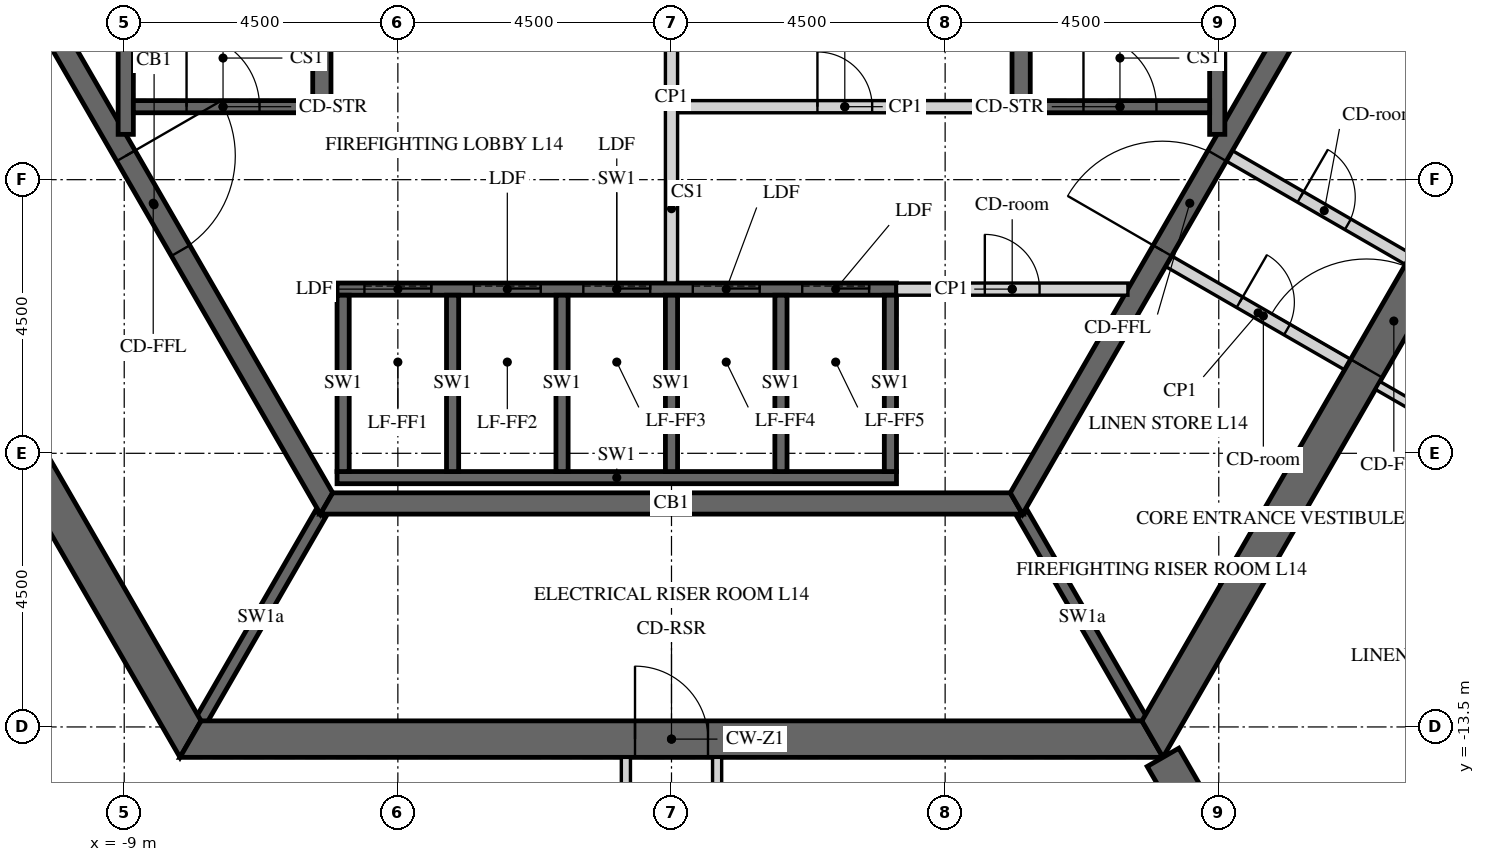
"""IFC4 building model, lengths in metres.
Left out: names, types, materials, properties, quantities, classifications, styles, units other than length and angle.
Written with IfcOpenShell. Run it as: python <this file> out.ifc"""

import sys

from ifc_helpers import new_model, si_unit, direction, frame, frame_2d, origin, place, context, subcontext, project, spatial, polyline, rectangle, outline, extrude, element, fill, save


model = new_model("IFC4")
c1 = context("Model", 3, precision=1e-05, world=origin(), true_north=direction((0.0, 1.0)))
c2 = subcontext(c1, "Body", "Model", "MODEL_VIEW")
j1 = project(units=[si_unit("LENGTHUNIT", "METRE"), si_unit("PLANEANGLEUNIT", "RADIAN")], contexts=[c1])
p1 = place(None, origin())
s1 = spatial("IfcSite", under=j1, at=p1, CompositionType="ELEMENT")
p2 = place(p1, origin())
s2 = spatial("IfcBuilding", under=s1, at=p2, CompositionType="ELEMENT")
p3 = place(p2, frame((0.0, 0.0, 68.7)))
s3 = spatial("IfcBuildingStorey", under=s2, at=p3, CompositionType="ELEMENT", Elevation=68.7)
p4 = place(p3, frame((-15.819, 0.0, -0.15), z_axis=(0.0, 0.0, 1.0), x_axis=(0.499999880136, -0.866025472988, 0.0)))
e1 = element("IfcWall", 1, at=p4, inside=s3, PredefinedType="SHEAR", context=c2, shape_type="SweptSolid", body=[
    extrude(outline(polyline([(-0.173, -0.3), (15.993, -0.3), (15.646, 0.3), (0.173, 0.3), (-0.173, -0.3)])), origin(), (0.0, 0.0, 1.0), 3.9),
])
p5 = place(p4, frame((6.981, 0.0, 0.15)))
e2 = element("IfcOpeningElement", 2, at=p5, cuts=e1, PredefinedType="OPENING", context=c2, shape_type="SweptSolid", body=[
    extrude(rectangle(XDim=1.8, YDim=2.4, at=frame_2d((0.9, 1.2))), frame((0.0, 0.31, 0.0), z_axis=(0.0, -1.0, 0.0), x_axis=(1.0, 0.0, 0.0)), (0.0, 0.0, 1.0), 0.62),
])
p6 = place(p3, frame((-7.91, -13.7, -0.15), z_axis=(0.0, 0.0, 1.0), x_axis=(1.0, 0.0, 0.0)))
e3 = element("IfcWall", 3, at=p6, inside=s3, PredefinedType="SHEAR", context=c2, shape_type="SweptSolid", body=[
    extrude(outline(polyline([(-0.173, -0.3), (15.993, -0.3), (15.646, 0.3), (0.173, 0.3), (-0.173, -0.3)])), origin(), (0.0, 0.0, 1.0), 3.9),
])
p7 = place(p6, frame((7.31, 0.0, 0.15)))
e4 = element("IfcOpeningElement", 4, at=p7, cuts=e3, PredefinedType="OPENING", context=c2, shape_type="SweptSolid", body=[
    extrude(rectangle(XDim=1.2, YDim=2.4, at=frame_2d((0.6, 1.2))), frame((0.0, 0.31, 0.0), z_axis=(0.0, -1.0, 0.0), x_axis=(1.0, 0.0, 0.0)), (0.0, 0.0, 1.0), 0.62),
])
p8 = place(p3, frame((7.91, -13.7, -0.15), z_axis=(0.0, 0.0, 1.0), x_axis=(0.499999880136, 0.866025472988, 0.0)))
e5 = element("IfcWall", 5, at=p8, inside=s3, PredefinedType="SHEAR", context=c2, shape_type="SweptSolid", body=[
    extrude(outline(polyline([(-0.173, -0.3), (15.993, -0.3), (15.646, 0.3), (0.173, 0.3), (-0.173, -0.3)])), origin(), (0.0, 0.0, 1.0), 3.9),
])
p9 = place(p8, frame((7.039, 0.0, 0.15)))
e6 = element("IfcOpeningElement", 6, at=p9, cuts=e5, PredefinedType="OPENING", context=c2, shape_type="SweptSolid", body=[
    extrude(rectangle(XDim=1.8, YDim=2.4, at=frame_2d((0.9, 1.2))), frame((0.0, 0.31, 0.0), z_axis=(0.0, -1.0, 0.0), x_axis=(1.0, 0.0, 0.0)), (0.0, 0.0, 1.0), 0.62),
])
p10 = place(p3, frame((8.083, -14.0, -0.15), z_axis=(0.0, 0.0, 1.0), x_axis=(0.499997680643, -0.866026742862, 0.0)))
e7 = element("IfcWall", 7, at=p10, inside=s3, PredefinedType="SHEAR", context=c2, shape_type="SweptSolid", body=[
    extrude(rectangle(XDim=16.509, YDim=0.6, at=frame_2d((8.254, 0.0))), origin(), (0.0, 0.0, 1.0), 3.9),
])
p11 = place(p10, frame((7.354, 0.0, 0.15)))
e8 = element("IfcOpeningElement", 8, at=p11, cuts=e7, PredefinedType="OPENING", context=c2, shape_type="SweptSolid", body=[
    extrude(rectangle(XDim=1.8, YDim=2.4, at=frame_2d((0.9, 1.2))), frame((0.0, 0.31, 0.0), z_axis=(0.0, -1.0, 0.0), x_axis=(1.0, 0.0, 0.0)), (0.0, 0.0, 1.0), 0.62),
])
p12 = place(p3, frame((-11.345, 0.0, -0.15), z_axis=(0.0, 0.0, 1.0), x_axis=(0.499995046907, -0.866028263435, 0.0)))
e9 = element("IfcWall", 9, at=p12, inside=s3, PredefinedType="SHEAR", context=c2, shape_type="SweptSolid", body=[
    extrude(outline(polyline([(-0.101, -0.175), (11.446, -0.175), (11.244, 0.175), (0.101, 0.175), (-0.101, -0.175)])), origin(), (0.0, 0.0, 1.0), 3.9),
])
p13 = place(p12, frame((4.744, 0.0, 0.15)))
e10 = element("IfcOpeningElement", 10, at=p13, cuts=e9, PredefinedType="OPENING", context=c2, shape_type="SweptSolid", body=[
    extrude(rectangle(XDim=1.8, YDim=2.4, at=frame_2d((0.9, 1.2))), frame((0.0, 0.185, 0.0), z_axis=(0.0, -1.0, 0.0), x_axis=(1.0, 0.0, 0.0)), (0.0, 0.0, 1.0), 0.37),
])
p14 = place(p3, frame((-5.673, -9.825, -0.15), z_axis=(0.0, 0.0, 1.0), x_axis=(1.0, 0.0, 0.0)))
e11 = element("IfcWall", 11, at=p14, inside=s3, PredefinedType="SHEAR", context=c2, shape_type="SweptSolid", body=[
    extrude(outline(polyline([(-0.101, -0.175), (11.446, -0.175), (11.244, 0.175), (0.101, 0.175), (-0.101, -0.175)])), origin(), (0.0, 0.0, 1.0), 3.9),
])
p15 = place(p3, frame((5.673, -9.825, -0.15), z_axis=(0.0, 0.0, 1.0), x_axis=(0.499995046907, 0.866028263435, 0.0)))
e12 = element("IfcWall", 12, at=p15, inside=s3, PredefinedType="SHEAR", context=c2, shape_type="SweptSolid", body=[
    extrude(outline(polyline([(-0.101, -0.175), (11.446, -0.175), (11.244, 0.175), (0.101, 0.175), (-0.101, -0.175)])), origin(), (0.0, 0.0, 1.0), 3.9),
])
p16 = place(p15, frame((4.801, 0.0, 0.15)))
e13 = element("IfcOpeningElement", 13, at=p16, cuts=e12, PredefinedType="OPENING", context=c2, shape_type="SweptSolid", body=[
    extrude(rectangle(XDim=1.8, YDim=2.4, at=frame_2d((0.9, 1.2))), frame((0.0, 0.185, 0.0), z_axis=(0.0, -1.0, 0.0), x_axis=(1.0, 0.0, 0.0)), (0.0, 0.0, 1.0), 0.37),
])
p17 = place(p3, frame((-5.5, -6.3, -0.25), z_axis=(0.0, 0.0, 1.0), x_axis=(1.0, 0.0, 0.0)))
e14 = element("IfcWall", 14, at=p17, inside=s3, PredefinedType="SHEAR", context=c2, shape_type="SweptSolid", body=[
    extrude(rectangle(XDim=9.2, YDim=0.2, at=frame_2d((4.6, 0.0))), origin(), (0.0, 0.0, 1.0), 3.9),
])
p18 = place(p17, frame((0.45, 0.0, 0.25)))
e15 = element("IfcOpeningElement", 15, at=p18, cuts=e14, PredefinedType="OPENING", context=c2, shape_type="SweptSolid", body=[
    extrude(rectangle(XDim=1.1, YDim=2.1, at=frame_2d((0.55, 1.05))), frame((0.0, 0.11, 0.0), z_axis=(0.0, -1.0, 0.0), x_axis=(1.0, 0.0, 0.0)), (0.0, 0.0, 1.0), 0.22),
])
p19 = place(p17, frame((2.25, 0.0, 0.25)))
e16 = element("IfcOpeningElement", 16, at=p19, cuts=e14, PredefinedType="OPENING", context=c2, shape_type="SweptSolid", body=[
    extrude(rectangle(XDim=1.1, YDim=2.1, at=frame_2d((0.55, 1.05))), frame((0.0, 0.11, 0.0), z_axis=(0.0, -1.0, 0.0), x_axis=(1.0, 0.0, 0.0)), (0.0, 0.0, 1.0), 0.22),
])
p20 = place(p17, frame((4.05, 0.0, 0.25)))
e17 = element("IfcOpeningElement", 17, at=p20, cuts=e14, PredefinedType="OPENING", context=c2, shape_type="SweptSolid", body=[
    extrude(rectangle(XDim=1.1, YDim=2.1, at=frame_2d((0.55, 1.05))), frame((0.0, 0.11, 0.0), z_axis=(0.0, -1.0, 0.0), x_axis=(1.0, 0.0, 0.0)), (0.0, 0.0, 1.0), 0.22),
])
p21 = place(p17, frame((5.85, 0.0, 0.25)))
e18 = element("IfcOpeningElement", 18, at=p21, cuts=e14, PredefinedType="OPENING", context=c2, shape_type="SweptSolid", body=[
    extrude(rectangle(XDim=1.1, YDim=2.1, at=frame_2d((0.55, 1.05))), frame((0.0, 0.11, 0.0), z_axis=(0.0, -1.0, 0.0), x_axis=(1.0, 0.0, 0.0)), (0.0, 0.0, 1.0), 0.22),
])
p22 = place(p17, frame((7.65, 0.0, 0.25)))
e19 = element("IfcOpeningElement", 19, at=p22, cuts=e14, PredefinedType="OPENING", context=c2, shape_type="SweptSolid", body=[
    extrude(rectangle(XDim=1.1, YDim=2.1, at=frame_2d((0.55, 1.05))), frame((0.0, 0.11, 0.0), z_axis=(0.0, -1.0, 0.0), x_axis=(1.0, 0.0, 0.0)), (0.0, 0.0, 1.0), 0.22),
])
p23 = place(p3, frame((-5.5, -9.4, -0.25), z_axis=(0.0, 0.0, 1.0), x_axis=(1.0, 0.0, 0.0)))
e20 = element("IfcWall", 20, at=p23, inside=s3, PredefinedType="SHEAR", context=c2, shape_type="SweptSolid", body=[
    extrude(rectangle(XDim=9.2, YDim=0.2, at=frame_2d((4.6, 0.0))), origin(), (0.0, 0.0, 1.0), 3.9),
])
for number, where, z_axis, x_axis in (
    (21, (-5.4, -9.3, -0.25), (0.0, 0.0, 1.0), (0.0, 1.0, 0.0)),
    (22, (-3.6, -9.3, -0.25), (0.0, 0.0, 1.0), (0.0, 1.0, 0.0)),
    (23, (-1.8, -9.3, -0.25), (0.0, 0.0, 1.0), (0.0, 1.0, 0.0)),
    (24, (0.0, -9.3, -0.25), (0.0, 0.0, 1.0), (0.0, 1.0, 0.0)),
    (25, (1.8, -9.3, -0.25), (0.0, 0.0, 1.0), (0.0, 1.0, 0.0)),
    (26, (3.6, -9.3, -0.25), (0.0, 0.0, 1.0), (0.0, 1.0, 0.0)),
):
    element("IfcWall", number, at=place(p3, frame(where, z_axis=z_axis, x_axis=x_axis)), inside=s3, PredefinedType="SHEAR", context=c2, shape_type="SweptSolid", body=[
        extrude(rectangle(XDim=2.9, YDim=0.2, at=frame_2d((1.45, 0.0))), origin(), (0.0, 0.0, 1.0), 3.9),
    ])
p24 = place(p3, frame((0.1, -3.3, 0.0), z_axis=(0.0, 0.0, 1.0), x_axis=(1.0, 0.0, 0.0)))
e27 = element("IfcWall", 27, at=p24, inside=s3, PredefinedType="PARTITIONING", context=c2, shape_type="SweptSolid", body=[
    extrude(rectangle(XDim=5.5, YDim=0.2, at=frame_2d((2.75, 0.0))), origin(), (0.0, 0.0, 1.0), 3.65),
])
p25 = place(p24, frame((2.3, 0.0, 0.0)))
e28 = element("IfcOpeningElement", 28, at=p25, cuts=e27, PredefinedType="OPENING", context=c2, shape_type="SweptSolid", body=[
    extrude(rectangle(XDim=0.9, YDim=2.1, at=frame_2d((0.45, 1.05))), frame((0.0, 0.11, 0.0), z_axis=(0.0, -1.0, 0.0), x_axis=(1.0, 0.0, 0.0)), (0.0, 0.0, 1.0), 0.22),
])
p26 = place(p3, frame((0.0, -6.2, 0.0), z_axis=(0.0, 0.0, 1.0), x_axis=(0.0, 1.0, 0.0)))
e29 = element("IfcWall", 29, at=p26, inside=s3, PredefinedType="PARTITIONING", context=c2, shape_type="SweptSolid", body=[
    extrude(rectangle(XDim=6.1, YDim=0.2, at=frame_2d((3.05, 0.0))), origin(), (0.0, 0.0, 1.0), 3.65),
])
p27 = place(p3, frame((3.7, -6.3, 0.0), z_axis=(0.0, 0.0, 1.0), x_axis=(1.0, 0.0, 0.0)))
e30 = element("IfcWall", 30, at=p27, inside=s3, PredefinedType="PARTITIONING", context=c2, shape_type="SweptSolid", body=[
    extrude(rectangle(XDim=3.806, YDim=0.2, at=frame_2d((1.903, 0.0))), origin(), (0.0, 0.0, 1.0), 3.65),
])
p28 = place(p27, frame((1.453, 0.0, 0.0)))
e31 = element("IfcOpeningElement", 31, at=p28, cuts=e30, PredefinedType="OPENING", context=c2, shape_type="SweptSolid", body=[
    extrude(rectangle(XDim=0.9, YDim=2.1, at=frame_2d((0.45, 1.05))), frame((0.0, 0.11, 0.0), z_axis=(0.0, -1.0, 0.0), x_axis=(1.0, 0.0, 0.0)), (0.0, 0.0, 1.0), 0.22),
])
for number, where, z_axis, x_axis in (
    (32, (-5.773, -10.0, -0.15), (0.0, 0.0, 1.0), (-0.5, -0.866, 0.0)),
    (33, (5.773, -10.0, -0.15), (0.0, 0.0, 1.0), (0.5, -0.866, 0.0)),
):
    element("IfcWall", number, at=place(p3, frame(where, z_axis=z_axis, x_axis=x_axis)), inside=s3, PredefinedType="SHEAR", context=c2, shape_type="SweptSolid", body=[
        extrude(rectangle(XDim=3.926, YDim=0.2, at=frame_2d((1.963, 0.0))), origin(), (0.0, 0.0, 1.0), 3.9),
    ])
p29 = place(p3, frame((9.175, -4.109, 0.0), z_axis=(0.0, 0.0, 1.0), x_axis=(0.865989465428, -0.500062241894, 0.0)))
e34 = element("IfcWall", 34, at=p29, inside=s3, PredefinedType="PARTITIONING", context=c2, shape_type="SweptSolid", body=[
    extrude(rectangle(XDim=3.4, YDim=0.2, at=frame_2d((1.7, 0.0))), origin(), (0.0, 0.0, 1.0), 3.65),
])
p30 = place(p29, frame((1.351, 0.0, 0.0)))
e35 = element("IfcOpeningElement", 35, at=p30, cuts=e34, PredefinedType="OPENING", context=c2, shape_type="SweptSolid", body=[
    extrude(rectangle(XDim=0.9, YDim=2.1, at=frame_2d((0.45, 1.05))), frame((0.0, 0.11, 0.0), z_axis=(0.0, -1.0, 0.0), x_axis=(1.0, 0.0, 0.0)), (0.0, 0.0, 1.0), 0.22),
])
p31 = place(p3, frame((8.175, -5.841, 0.0), z_axis=(0.0, 0.0, 1.0), x_axis=(0.866020560687, -0.500008388397, 0.0)))
e36 = element("IfcWall", 36, at=p31, inside=s3, PredefinedType="PARTITIONING", context=c2, shape_type="SweptSolid", body=[
    extrude(rectangle(XDim=3.4, YDim=0.2, at=frame_2d((1.7, 0.0))), origin(), (0.0, 0.0, 1.0), 3.65),
])
p32 = place(p31, frame((1.35, 0.0, 0.0)))
e37 = element("IfcOpeningElement", 37, at=p32, cuts=e36, PredefinedType="OPENING", context=c2, shape_type="SweptSolid", body=[
    extrude(rectangle(XDim=0.9, YDim=2.1, at=frame_2d((0.45, 1.05))), frame((0.0, 0.11, 0.0), z_axis=(0.0, -1.0, 0.0), x_axis=(1.0, 0.0, 0.0)), (0.0, 0.0, 1.0), 0.22),
])
p33 = place(p3, frame((5.75, -3.4, -0.25), z_axis=(0.0, 0.0, 1.0), x_axis=(0.0, 1.0, 0.0)))
e38 = element("IfcWall", 38, at=p33, inside=s3, PredefinedType="SHEAR", context=c2, shape_type="SweptSolid", body=[
    extrude(rectangle(XDim=6.8, YDim=0.3, at=frame_2d((3.4, 0.0))), origin(), (0.0, 0.0, 1.0), 3.9),
])
p34 = place(p3, frame((8.975, -3.755, -0.25), z_axis=(0.0, 0.0, 1.0), x_axis=(0.0, 1.0, 0.0)))
e39 = element("IfcWall", 39, at=p34, inside=s3, PredefinedType="SHEAR", context=c2, shape_type="SweptSolid", body=[
    extrude(rectangle(XDim=7.51, YDim=0.25, at=frame_2d((3.755, 0.0))), origin(), (0.0, 0.0, 1.0), 3.9),
])
p35 = place(p3, frame((5.9, -3.3, -0.25), z_axis=(0.0, 0.0, 1.0), x_axis=(1.0, 0.0, 0.0)))
e40 = element("IfcWall", 40, at=p35, inside=s3, PredefinedType="SHEAR", context=c2, shape_type="SweptSolid", body=[
    extrude(rectangle(XDim=2.95, YDim=0.2, at=frame_2d((1.475, 0.0))), origin(), (0.0, 0.0, 1.0), 3.9),
])
p36 = place(p35, frame((0.875, 0.0, 0.25)))
e41 = element("IfcOpeningElement", 41, at=p36, cuts=e40, PredefinedType="OPENING", context=c2, shape_type="SweptSolid", body=[
    extrude(rectangle(XDim=1.2, YDim=2.4, at=frame_2d((0.6, 1.2))), frame((0.0, 0.11, 0.0), z_axis=(0.0, -1.0, 0.0), x_axis=(1.0, 0.0, 0.0)), (0.0, 0.0, 1.0), 0.22),
])
p37 = place(p3, frame((-5.75, -3.4, -0.25), z_axis=(0.0, 0.0, 1.0), x_axis=(0.0, 1.0, 0.0)))
e42 = element("IfcWall", 42, at=p37, inside=s3, PredefinedType="SHEAR", context=c2, shape_type="SweptSolid", body=[
    extrude(rectangle(XDim=6.8, YDim=0.3, at=frame_2d((3.4, 0.0))), origin(), (0.0, 0.0, 1.0), 3.9),
])
p38 = place(p3, frame((-8.975, -3.755, -0.25), z_axis=(0.0, 0.0, 1.0), x_axis=(0.0, 1.0, 0.0)))
e43 = element("IfcWall", 43, at=p38, inside=s3, PredefinedType="SHEAR", context=c2, shape_type="SweptSolid", body=[
    extrude(rectangle(XDim=7.51, YDim=0.25, at=frame_2d((3.755, 0.0))), origin(), (0.0, 0.0, 1.0), 3.9),
])
p39 = place(p3, frame((-8.85, -3.3, -0.25), z_axis=(0.0, 0.0, 1.0), x_axis=(1.0, 0.0, 0.0)))
e44 = element("IfcWall", 44, at=p39, inside=s3, PredefinedType="SHEAR", context=c2, shape_type="SweptSolid", body=[
    extrude(rectangle(XDim=2.95, YDim=0.2, at=frame_2d((1.475, 0.0))), origin(), (0.0, 0.0, 1.0), 3.9),
])
p40 = place(p39, frame((0.875, 0.0, 0.25)))
e45 = element("IfcOpeningElement", 45, at=p40, cuts=e44, PredefinedType="OPENING", context=c2, shape_type="SweptSolid", body=[
    extrude(rectangle(XDim=1.2, YDim=2.4, at=frame_2d((0.6, 1.2))), frame((0.0, 0.11, 0.0), z_axis=(0.0, -1.0, 0.0), x_axis=(1.0, 0.0, 0.0)), (0.0, 0.0, 1.0), 0.22),
])
p41 = place(p3, frame((-0.75, -14.0, 0.0), z_axis=(0.0, 0.0, 1.0), x_axis=(0.0, -1.0, 0.0)))
e46 = element("IfcWall", 46, at=p41, inside=s3, PredefinedType="PARTITIONING", context=c2, shape_type="SweptSolid", body=[
    extrude(rectangle(XDim=6.252, YDim=0.15, at=frame_2d((3.126, 0.0))), origin(), (0.0, 0.0, 1.0), 2.988),
])
p42 = place(p3, frame((0.75, -20.072, 0.0), z_axis=(0.0, 0.0, 1.0), x_axis=(0.0, 1.0, 0.0)))
e47 = element("IfcWall", 47, at=p42, inside=s3, PredefinedType="PARTITIONING", context=c2, shape_type="SweptSolid", body=[
    extrude(rectangle(XDim=6.072, YDim=0.15, at=frame_2d((3.036, 0.0))), origin(), (0.0, 0.0, 1.0), 2.988),
])
p43 = place(p3, frame((11.614, -7.884, 0.0), z_axis=(0.0, 0.0, 1.0), x_axis=(0.866033542371, -0.499985903289, 0.0)))
e48 = element("IfcWall", 48, at=p43, inside=s3, PredefinedType="PARTITIONING", context=c2, shape_type="SweptSolid", body=[
    extrude(rectangle(XDim=6.15, YDim=0.15, at=frame_2d((3.075, 0.0))), origin(), (0.0, 0.0, 1.0), 2.988),
])
p44 = place(p9, origin())
e49 = element("IfcDoor", 49, at=p44, inside=s3, OperationType="DOUBLE_DOOR_SINGLE_SWING", PredefinedType="DOOR", context=c2, shape_type="SweptSolid", body=[
    extrude(rectangle(XDim=1.8, YDim=2.4, at=frame_2d((0.9, 1.2))), frame((0.0, 0.025, 0.0), z_axis=(0.0, -1.0, 0.0), x_axis=(1.0, 0.0, 0.0)), (0.0, 0.0, 1.0), 0.05),
])
fill(e6, e49)
p45 = place(p7, origin())
e50 = element("IfcDoor", 50, at=p45, inside=s3, OperationType="SINGLE_SWING_LEFT", PredefinedType="DOOR", context=c2, shape_type="SweptSolid", body=[
    extrude(rectangle(XDim=1.2, YDim=2.4, at=frame_2d((0.6, 1.2))), frame((0.0, 0.025, 0.0), z_axis=(0.0, -1.0, 0.0), x_axis=(1.0, 0.0, 0.0)), (0.0, 0.0, 1.0), 0.05),
])
fill(e4, e50)
p46 = place(p13, origin())
e51 = element("IfcDoor", 51, at=p46, inside=s3, OperationType="DOUBLE_DOOR_SINGLE_SWING", PredefinedType="DOOR", context=c2, shape_type="SweptSolid", body=[
    extrude(rectangle(XDim=1.8, YDim=2.4, at=frame_2d((0.9, 1.2))), frame((0.0, 0.025, 0.0), z_axis=(0.0, -1.0, 0.0), x_axis=(1.0, 0.0, 0.0)), (0.0, 0.0, 1.0), 0.05),
])
fill(e10, e51)
p47 = place(p16, origin())
e52 = element("IfcDoor", 52, at=p47, inside=s3, OperationType="DOUBLE_DOOR_SINGLE_SWING", PredefinedType="DOOR", context=c2, shape_type="SweptSolid", body=[
    extrude(rectangle(XDim=1.8, YDim=2.4, at=frame_2d((0.9, 1.2))), frame((0.0, 0.025, 0.0), z_axis=(0.0, -1.0, 0.0), x_axis=(1.0, 0.0, 0.0)), (0.0, 0.0, 1.0), 0.05),
])
fill(e13, e52)
p48 = place(p25, origin())
e53 = element("IfcDoor", 53, at=p48, inside=s3, OperationType="SINGLE_SWING_LEFT", PredefinedType="DOOR", context=c2, shape_type="SweptSolid", body=[
    extrude(rectangle(XDim=0.9, YDim=2.1, at=frame_2d((0.45, 1.05))), frame((0.0, 0.025, 0.0), z_axis=(0.0, -1.0, 0.0), x_axis=(1.0, 0.0, 0.0)), (0.0, 0.0, 1.0), 0.05),
])
fill(e28, e53)
p49 = place(p28, origin())
e54 = element("IfcDoor", 54, at=p49, inside=s3, OperationType="SINGLE_SWING_LEFT", PredefinedType="DOOR", context=c2, shape_type="SweptSolid", body=[
    extrude(rectangle(XDim=0.9, YDim=2.1, at=frame_2d((0.45, 1.05))), frame((0.0, 0.025, 0.0), z_axis=(0.0, -1.0, 0.0), x_axis=(1.0, 0.0, 0.0)), (0.0, 0.0, 1.0), 0.05),
])
fill(e31, e54)
p50 = place(p30, origin())
e55 = element("IfcDoor", 55, at=p50, inside=s3, OperationType="SINGLE_SWING_LEFT", PredefinedType="DOOR", context=c2, shape_type="SweptSolid", body=[
    extrude(rectangle(XDim=0.9, YDim=2.1, at=frame_2d((0.45, 1.05))), frame((0.0, 0.025, 0.0), z_axis=(0.0, -1.0, 0.0), x_axis=(1.0, 0.0, 0.0)), (0.0, 0.0, 1.0), 0.05),
])
fill(e35, e55)
p51 = place(p32, origin())
e56 = element("IfcDoor", 56, at=p51, inside=s3, OperationType="SINGLE_SWING_LEFT", PredefinedType="DOOR", context=c2, shape_type="SweptSolid", body=[
    extrude(rectangle(XDim=0.9, YDim=2.1, at=frame_2d((0.45, 1.05))), frame((0.0, 0.025, 0.0), z_axis=(0.0, -1.0, 0.0), x_axis=(1.0, 0.0, 0.0)), (0.0, 0.0, 1.0), 0.05),
])
fill(e37, e56)
p52 = place(p36, origin())
e57 = element("IfcDoor", 57, at=p52, inside=s3, OperationType="SINGLE_SWING_LEFT", PredefinedType="DOOR", context=c2, shape_type="SweptSolid", body=[
    extrude(rectangle(XDim=1.2, YDim=2.4, at=frame_2d((0.6, 1.2))), frame((0.0, 0.025, 0.0), z_axis=(0.0, -1.0, 0.0), x_axis=(1.0, 0.0, 0.0)), (0.0, 0.0, 1.0), 0.05),
])
fill(e41, e57)
p53 = place(p40, origin())
e58 = element("IfcDoor", 58, at=p53, inside=s3, OperationType="SINGLE_SWING_LEFT", PredefinedType="DOOR", context=c2, shape_type="SweptSolid", body=[
    extrude(rectangle(XDim=1.2, YDim=2.4, at=frame_2d((0.6, 1.2))), frame((0.0, 0.025, 0.0), z_axis=(0.0, -1.0, 0.0), x_axis=(1.0, 0.0, 0.0)), (0.0, 0.0, 1.0), 0.05),
])
fill(e45, e58)
p54 = place(p18, origin())
e59 = element("IfcDoor", 59, at=p54, inside=s3, OperationType="SLIDING_TO_LEFT", PredefinedType="DOOR", context=c2, shape_type="SweptSolid", body=[
    extrude(rectangle(XDim=1.1, YDim=2.1, at=frame_2d((0.55, 1.05))), frame((0.0, 0.025, 0.0), z_axis=(0.0, -1.0, 0.0), x_axis=(1.0, 0.0, 0.0)), (0.0, 0.0, 1.0), 0.05),
])
fill(e15, e59)
p55 = place(p19, origin())
e60 = element("IfcDoor", 60, at=p55, inside=s3, OperationType="SLIDING_TO_LEFT", PredefinedType="DOOR", context=c2, shape_type="SweptSolid", body=[
    extrude(rectangle(XDim=1.1, YDim=2.1, at=frame_2d((0.55, 1.05))), frame((0.0, 0.025, 0.0), z_axis=(0.0, -1.0, 0.0), x_axis=(1.0, 0.0, 0.0)), (0.0, 0.0, 1.0), 0.05),
])
fill(e16, e60)
p56 = place(p20, origin())
e61 = element("IfcDoor", 61, at=p56, inside=s3, OperationType="SLIDING_TO_LEFT", PredefinedType="DOOR", context=c2, shape_type="SweptSolid", body=[
    extrude(rectangle(XDim=1.1, YDim=2.1, at=frame_2d((0.55, 1.05))), frame((0.0, 0.025, 0.0), z_axis=(0.0, -1.0, 0.0), x_axis=(1.0, 0.0, 0.0)), (0.0, 0.0, 1.0), 0.05),
])
fill(e17, e61)
p57 = place(p21, origin())
e62 = element("IfcDoor", 62, at=p57, inside=s3, OperationType="SLIDING_TO_LEFT", PredefinedType="DOOR", context=c2, shape_type="SweptSolid", body=[
    extrude(rectangle(XDim=1.1, YDim=2.1, at=frame_2d((0.55, 1.05))), frame((0.0, 0.025, 0.0), z_axis=(0.0, -1.0, 0.0), x_axis=(1.0, 0.0, 0.0)), (0.0, 0.0, 1.0), 0.05),
])
fill(e18, e62)
p58 = place(p22, origin())
e63 = element("IfcDoor", 63, at=p58, inside=s3, OperationType="SLIDING_TO_LEFT", PredefinedType="DOOR", context=c2, shape_type="SweptSolid", body=[
    extrude(rectangle(XDim=1.1, YDim=2.1, at=frame_2d((0.55, 1.05))), frame((0.0, 0.025, 0.0), z_axis=(0.0, -1.0, 0.0), x_axis=(1.0, 0.0, 0.0)), (0.0, 0.0, 1.0), 0.05),
])
fill(e19, e63)
save(model, sys.argv[1])
